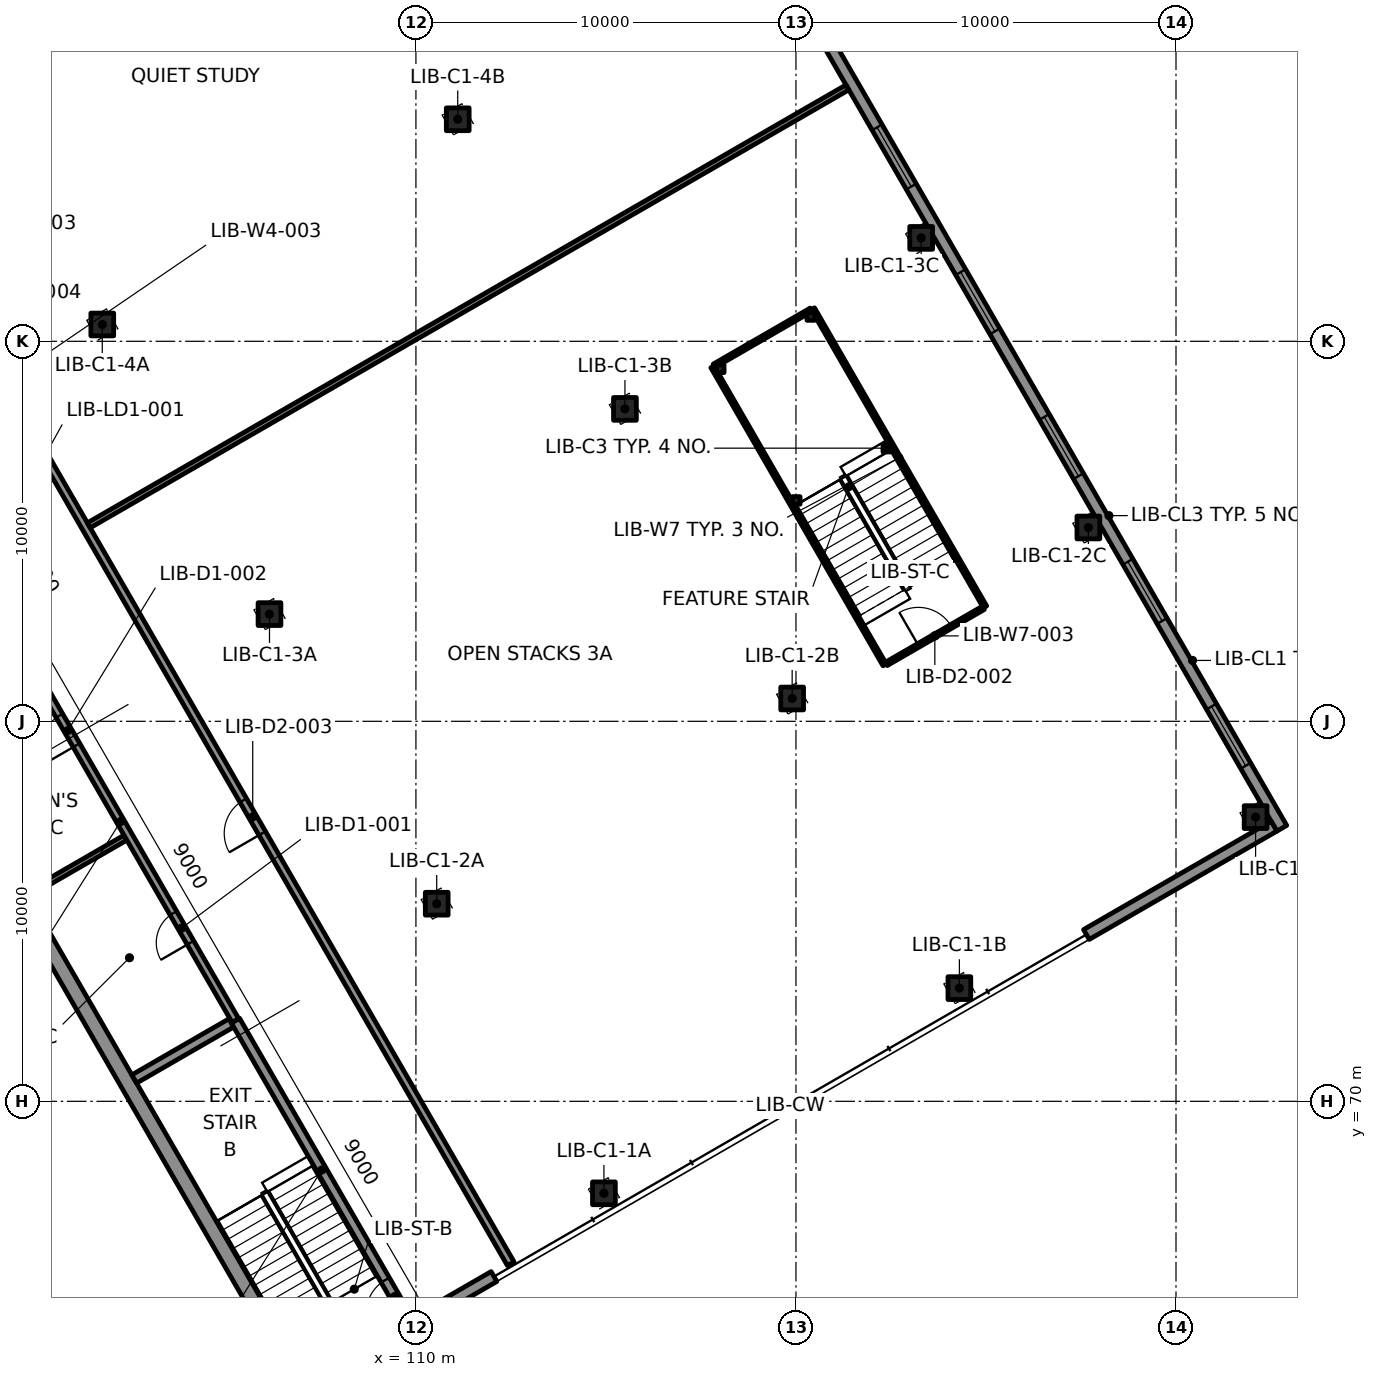
"""IFC4 building model, lengths in metres.
Left out: names, types, materials, properties, quantities, classifications, styles, units other than length and angle.
Written with IfcOpenShell. Run it as: python <this file> out.ifc"""

import sys

from ifc_helpers import new_model, si_unit, direction, frame, frame_2d, origin, origin_2d, place, context, subcontext, project, spatial, rectangle, extrude, element, fill, save


model = new_model("IFC4")
c1 = context("Model", 3, precision=1e-05, world=origin(), true_north=direction((0.0, 1.0)))
c2 = subcontext(c1, "Body", "Model", "MODEL_VIEW")
j1 = project(units=[si_unit("LENGTHUNIT", "METRE"), si_unit("PLANEANGLEUNIT", "RADIAN")], contexts=[c1])
p1 = place(None, origin())
s1 = spatial("IfcSite", under=j1, at=p1, CompositionType="ELEMENT")
p2 = place(p1, origin())
s2 = spatial("IfcBuilding", under=s1, at=p2, CompositionType="ELEMENT")
p3 = place(p2, frame((0.0, 0.0, 17.2)))
s3 = spatial("IfcBuildingStorey", under=s2, at=p3, CompositionType="ELEMENT", Elevation=17.2)
p4 = place(p3, frame((101.821, 68.315, -0.0), z_axis=(0.0, 0.0, 1.0), x_axis=(-0.5, 0.866025403784, 0.0)))
e1 = element("IfcColumn", 1, at=p4, inside=s3, PredefinedType="COLUMN", context=c2, shape_type="SweptSolid", body=[
    extrude(rectangle(XDim=1.2, YDim=1.5, at=origin_2d()), origin(), (0.0, 0.0, 1.0), 4.6),
])
p5 = place(p3, frame((103.019, 59.863, 0.0), z_axis=(0.0, 0.0, 1.0), x_axis=(-0.866027754727, 0.499995928025, 0.0)))
e2 = element("IfcWall", 2, at=p5, inside=s3, PredefinedType="PARTITIONING", context=c2, shape_type="SweptSolid", body=[
    extrude(rectangle(XDim=13.214, YDim=0.15, at=frame_2d((6.607, 0.0))), origin(), (0.0, 0.0, 1.0), 3.7),
])
for number, where, z_axis, x_axis in (
    (3, (114.947, 67.579, -0.36), (0.0, 0.0, 1.0), (1.0, 0.0, 0.0)),
    (4, (124.3, 72.979, -0.36), (0.0, 0.0, 1.0), (1.0, 0.0, 0.0)),
    (5, (132.094, 77.479, -0.36), (0.0, 0.0, 1.0), (1.0, 0.0, 0.0)),
    (6, (110.547, 75.2, -0.36), (0.0, 0.0, 1.0), (1.0, 0.0, 0.0)),
    (7, (119.9, 80.6, -0.36), (0.0, 0.0, 1.0), (1.0, 0.0, 0.0)),
    (8, (127.694, 85.1, -0.36), (0.0, 0.0, 1.0), (1.0, 0.0, 0.0)),
    (9, (106.147, 82.821, -0.36), (0.0, 0.0, 1.0), (1.0, 0.0, 0.0)),
    (10, (115.5, 88.221, -0.36), (0.0, 0.0, 1.0), (1.0, 0.0, 0.0)),
    (11, (123.294, 92.721, -0.36), (0.0, 0.0, 1.0), (1.0, 0.0, 0.0)),
    (12, (101.747, 90.442, -0.36), (0.0, 0.0, 1.0), (1.0, 0.0, 0.0)),
    (13, (111.1, 95.842, -0.36), (0.0, 0.0, 1.0), (1.0, 0.0, 0.0)),
):
    element("IfcColumn", number, at=place(p3, frame(where, z_axis=z_axis, x_axis=x_axis)), inside=s3, PredefinedType="COLUMN", context=c2, shape_type="SweptSolid", body=[
        extrude(rectangle(XDim=0.6, YDim=0.6, at=origin_2d()), origin(), (0.0, 0.0, 1.0), 4.6),
    ])
for number, where, z_axis, x_axis in (
    (14, (122.39, 87.188, -2.3), (0.0, 0.0, 1.0), (1.0, 0.0, 0.0)),
    (15, (120.008, 85.813, -2.3), (0.0, 0.0, 1.0), (1.0, 0.0, 0.0)),
    (16, (120.39, 90.652, -2.3), (0.0, 0.0, 1.0), (1.0, 0.0, 0.0)),
    (17, (118.008, 89.277, -2.3), (0.0, 0.0, 1.0), (1.0, 0.0, 0.0)),
):
    element("IfcColumn", number, at=place(p3, frame(where, z_axis=z_axis, x_axis=x_axis)), inside=s3, PredefinedType="COLUMN", context=c2, shape_type="SweptSolid", body=[
        extrude(rectangle(XDim=0.2, YDim=0.2, at=origin_2d()), origin(), (0.0, 0.0, 1.0), 4.4),
    ])
p6 = place(p3, frame((107.106, 62.36, 0.0), z_axis=(0.0, 0.0, 1.0), x_axis=(-0.49999992739, 0.866025445706, 0.0)))
e18 = element("IfcWall", 18, at=p6, inside=s3, PredefinedType="SOLIDWALL", context=c2, shape_type="SweptSolid", body=[
    extrude(rectangle(XDim=54.0, YDim=0.4, at=frame_2d((27.0, 0.0))), origin(), (0.0, 0.0, 1.0), 4.24),
])
p7 = place(p3, frame((132.784, 77.185, 0.0), z_axis=(0.0, 0.0, 1.0), x_axis=(-0.49999992739, 0.866025445706, 0.0)))
e19 = element("IfcWall", 19, at=p7, inside=s3, PredefinedType="SOLIDWALL", context=c2, shape_type="SweptSolid", body=[
    extrude(rectangle(XDim=54.0, YDim=0.3, at=frame_2d((27.0, 0.0))), origin(), (0.0, 0.0, 1.0), 4.24),
])
p8 = place(p7, frame((1.9, 0.0, 0.9)))
e20 = element("IfcOpeningElement", 20, at=p8, cuts=e19, PredefinedType="OPENING", context=c2, shape_type="SweptSolid", body=[
    extrude(rectangle(XDim=1.8, YDim=2.4, at=frame_2d((0.9, 1.2))), frame((0.0, 0.16, 0.0), z_axis=(0.0, -1.0, 0.0), x_axis=(1.0, 0.0, 0.0)), (0.0, 0.0, 1.0), 0.32),
])
p9 = place(p7, frame((6.3, 0.0, 0.9)))
e21 = element("IfcOpeningElement", 21, at=p9, cuts=e19, PredefinedType="OPENING", context=c2, shape_type="SweptSolid", body=[
    extrude(rectangle(XDim=1.8, YDim=2.4, at=frame_2d((0.9, 1.2))), frame((0.0, 0.16, 0.0), z_axis=(0.0, -1.0, 0.0), x_axis=(1.0, 0.0, 0.0)), (0.0, 0.0, 1.0), 0.32),
])
p10 = place(p7, frame((10.7, 0.0, 0.9)))
e22 = element("IfcOpeningElement", 22, at=p10, cuts=e19, PredefinedType="OPENING", context=c2, shape_type="SweptSolid", body=[
    extrude(rectangle(XDim=1.8, YDim=2.4, at=frame_2d((0.9, 1.2))), frame((0.0, 0.16, 0.0), z_axis=(0.0, -1.0, 0.0), x_axis=(1.0, 0.0, 0.0)), (0.0, 0.0, 1.0), 0.32),
])
p11 = place(p7, frame((15.1, 0.0, 0.9)))
e23 = element("IfcOpeningElement", 23, at=p11, cuts=e19, PredefinedType="OPENING", context=c2, shape_type="SweptSolid", body=[
    extrude(rectangle(XDim=1.8, YDim=2.4, at=frame_2d((0.9, 1.2))), frame((0.0, 0.16, 0.0), z_axis=(0.0, -1.0, 0.0), x_axis=(1.0, 0.0, 0.0)), (0.0, 0.0, 1.0), 0.32),
])
p12 = place(p7, frame((19.5, 0.0, 0.9)))
e24 = element("IfcOpeningElement", 24, at=p12, cuts=e19, PredefinedType="OPENING", context=c2, shape_type="SweptSolid", body=[
    extrude(rectangle(XDim=1.8, YDim=2.4, at=frame_2d((0.9, 1.2))), frame((0.0, 0.16, 0.0), z_axis=(0.0, -1.0, 0.0), x_axis=(1.0, 0.0, 0.0)), (0.0, 0.0, 1.0), 0.32),
])
p13 = place(p7, frame((23.9, 0.0, 0.9)))
e25 = element("IfcOpeningElement", 25, at=p13, cuts=e19, PredefinedType="OPENING", context=c2, shape_type="SweptSolid", body=[
    extrude(rectangle(XDim=1.8, YDim=2.4, at=frame_2d((0.9, 1.2))), frame((0.0, 0.16, 0.0), z_axis=(0.0, -1.0, 0.0), x_axis=(1.0, 0.0, 0.0)), (0.0, 0.0, 1.0), 0.32),
])
p14 = place(p7, frame((28.3, 0.0, 0.9)))
e26 = element("IfcOpeningElement", 26, at=p14, cuts=e19, PredefinedType="OPENING", context=c2, shape_type="SweptSolid", body=[
    extrude(rectangle(XDim=1.8, YDim=2.4, at=frame_2d((0.9, 1.2))), frame((0.0, 0.16, 0.0), z_axis=(0.0, -1.0, 0.0), x_axis=(1.0, 0.0, 0.0)), (0.0, 0.0, 1.0), 0.32),
])
p15 = place(p7, frame((32.7, 0.0, 0.9)))
e27 = element("IfcOpeningElement", 27, at=p15, cuts=e19, PredefinedType="OPENING", context=c2, shape_type="SweptSolid", body=[
    extrude(rectangle(XDim=1.8, YDim=2.4, at=frame_2d((0.9, 1.2))), frame((0.0, 0.16, 0.0), z_axis=(0.0, -1.0, 0.0), x_axis=(1.0, 0.0, 0.0)), (0.0, 0.0, 1.0), 0.32),
])
p16 = place(p7, frame((37.1, 0.0, 0.9)))
e28 = element("IfcOpeningElement", 28, at=p16, cuts=e19, PredefinedType="OPENING", context=c2, shape_type="SweptSolid", body=[
    extrude(rectangle(XDim=1.8, YDim=2.4, at=frame_2d((0.9, 1.2))), frame((0.0, 0.16, 0.0), z_axis=(0.0, -1.0, 0.0), x_axis=(1.0, 0.0, 0.0)), (0.0, 0.0, 1.0), 0.32),
])
p17 = place(p7, frame((50.3, 0.0, 0.9)))
e29 = element("IfcOpeningElement", 29, at=p17, cuts=e19, PredefinedType="OPENING", context=c2, shape_type="SweptSolid", body=[
    extrude(rectangle(XDim=1.8, YDim=2.4, at=frame_2d((0.9, 1.2))), frame((0.0, 0.16, 0.0), z_axis=(0.0, -1.0, 0.0), x_axis=(1.0, 0.0, 0.0)), (0.0, 0.0, 1.0), 0.32),
])
p18 = place(p3, frame((107.204, 62.59, 0.0), z_axis=(0.0, 0.0, 1.0), x_axis=(0.866045472092, 0.499965239061, 0.0)))
e30 = element("IfcWall", 30, at=p18, inside=s3, PredefinedType="SOLIDWALL", context=c2, shape_type="SweptSolid", body=[
    extrude(rectangle(XDim=5.6, YDim=0.3, at=frame_2d((2.8, 0.0))), origin(), (0.0, 0.0, 1.0), 4.24),
])
p19 = place(p3, frame((127.643, 74.389, 0.0), z_axis=(0.0, 0.0, 1.0), x_axis=(0.866025820012, 0.499999279071, 0.0)))
e31 = element("IfcWall", 31, at=p19, inside=s3, PredefinedType="SOLIDWALL", context=c2, shape_type="SweptSolid", body=[
    extrude(rectangle(XDim=5.7, YDim=0.3, at=frame_2d((2.85, 0.0))), origin(), (0.0, 0.0, 1.0), 4.24),
])
p20 = place(p3, frame((102.587, 70.587, 0.0), z_axis=(0.0, 0.0, 1.0), x_axis=(0.866039495442, 0.49997559174, 0.0)))
e32 = element("IfcWall", 32, at=p20, inside=s3, PredefinedType="SOLIDWALL", context=c2, shape_type="SweptSolid", body=[
    extrude(rectangle(XDim=2.95, YDim=0.25, at=frame_2d((1.475, 0.0))), origin(), (0.0, 0.0, 1.0), 4.24),
])
p21 = place(p3, frame((109.792, 64.257, 0.0), z_axis=(0.0, 0.0, 1.0), x_axis=(-0.499994616197, 0.866028512102, 0.0)))
e33 = element("IfcWall", 33, at=p21, inside=s3, PredefinedType="SOLIDWALL", context=c2, shape_type="SweptSolid", body=[
    extrude(rectangle(XDim=9.085, YDim=0.25, at=frame_2d((4.542, 0.0))), origin(), (0.0, 0.0, 1.0), 4.24),
])
p22 = place(p21, frame((0.2, 0.0, 0.0)))
e34 = element("IfcOpeningElement", 34, at=p22, cuts=e33, PredefinedType="OPENING", context=c2, shape_type="SweptSolid", body=[
    extrude(rectangle(XDim=1.0, YDim=2.1, at=frame_2d((0.5, 1.05))), frame((0.0, 0.135, 0.0), z_axis=(0.0, -1.0, 0.0), x_axis=(1.0, 0.0, 0.0)), (0.0, 0.0, 1.0), 0.27),
])
p23 = place(p3, frame((99.779, 75.45, 0.0), z_axis=(0.0, 0.0, 1.0), x_axis=(0.866017493347, 0.500013701029, 0.0)))
e35 = element("IfcWall", 35, at=p23, inside=s3, PredefinedType="PARTITIONING", context=c2, shape_type="SweptSolid", body=[
    extrude(rectangle(XDim=2.975, YDim=0.15, at=frame_2d((1.488, 0.0))), origin(), (0.0, 0.0, 1.0), 4.24),
])
p24 = place(p3, frame((105.25, 72.125, 0.0), z_axis=(0.0, 0.0, 1.0), x_axis=(-0.499996309931, 0.866027534236, 0.0)))
e36 = element("IfcWall", 36, at=p24, inside=s3, PredefinedType="PARTITIONING", context=c2, shape_type="SweptSolid", body=[
    extrude(rectangle(XDim=12.09, YDim=0.2, at=frame_2d((6.045, 0.0))), origin(), (0.0, 0.0, 1.0), 4.24),
])
p25 = place(p24, frame((2.365, 0.0, 0.0)))
e37 = element("IfcOpeningElement", 37, at=p25, cuts=e36, PredefinedType="OPENING", context=c2, shape_type="SweptSolid", body=[
    extrude(rectangle(XDim=0.9, YDim=2.1, at=frame_2d((0.45, 1.05))), frame((0.0, 0.11, 0.0), z_axis=(0.0, -1.0, 0.0), x_axis=(1.0, 0.0, 0.0)), (0.0, 0.0, 1.0), 0.22),
])
p26 = place(p24, frame((8.365, 0.0, 0.0)))
e38 = element("IfcOpeningElement", 38, at=p26, cuts=e36, PredefinedType="OPENING", context=c2, shape_type="SweptSolid", body=[
    extrude(rectangle(XDim=0.9, YDim=2.1, at=frame_2d((0.45, 1.05))), frame((0.0, 0.11, 0.0), z_axis=(0.0, -1.0, 0.0), x_axis=(1.0, 0.0, 0.0)), (0.0, 0.0, 1.0), 0.22),
])
p27 = place(p3, frame((112.496, 65.725, 0.0), z_axis=(0.0, 0.0, 1.0), x_axis=(-0.499998673217, 0.866026169802, 0.0)))
e39 = element("IfcWall", 39, at=p27, inside=s3, PredefinedType="PARTITIONING", context=c2, shape_type="SweptSolid", body=[
    extrude(rectangle(XDim=53.48, YDim=0.2, at=frame_2d((26.74, 0.0))), origin(), (0.0, 0.0, 1.0), 4.24),
])
p28 = place(p27, frame((13.08, 0.0, 0.0)))
e40 = element("IfcOpeningElement", 40, at=p28, cuts=e39, PredefinedType="OPENING", context=c2, shape_type="SweptSolid", body=[
    extrude(rectangle(XDim=1.0, YDim=2.1, at=frame_2d((0.5, 1.05))), frame((0.0, 0.11, 0.0), z_axis=(0.0, -1.0, 0.0), x_axis=(1.0, 0.0, 0.0)), (0.0, 0.0, 1.0), 0.22),
])
p29 = place(p27, frame((26.28, 0.0, 0.0)))
e41 = element("IfcOpeningElement", 41, at=p29, cuts=e39, PredefinedType="OPENING", context=c2, shape_type="SweptSolid", body=[
    extrude(rectangle(XDim=1.0, YDim=2.1, at=frame_2d((0.5, 1.05))), frame((0.0, 0.11, 0.0), z_axis=(0.0, -1.0, 0.0), x_axis=(1.0, 0.0, 0.0)), (0.0, 0.0, 1.0), 0.22),
])
p30 = place(p27, frame((43.88, 0.0, 0.0)))
e42 = element("IfcOpeningElement", 42, at=p30, cuts=e39, PredefinedType="OPENING", context=c2, shape_type="SweptSolid", body=[
    extrude(rectangle(XDim=1.0, YDim=2.1, at=frame_2d((0.5, 1.05))), frame((0.0, 0.11, 0.0), z_axis=(0.0, -1.0, 0.0), x_axis=(1.0, 0.0, 0.0)), (0.0, 0.0, 1.0), 0.22),
])
p31 = place(p27, frame((50.58, 0.0, 0.0)))
e43 = element("IfcOpeningElement", 43, at=p31, cuts=e39, PredefinedType="OPENING", context=c2, shape_type="SweptSolid", body=[
    extrude(rectangle(XDim=1.0, YDim=2.1, at=frame_2d((0.5, 1.05))), frame((0.0, 0.11, 0.0), z_axis=(0.0, -1.0, 0.0), x_axis=(1.0, 0.0, 0.0)), (0.0, 0.0, 1.0), 0.22),
])
p32 = place(p3, frame((101.392, 85.157, 0.0), z_axis=(0.0, 0.0, 1.0), x_axis=(0.866022961126, 0.500004230785, 0.0)))
e44 = element("IfcWall", 44, at=p32, inside=s3, PredefinedType="PARTITIONING", context=c2, shape_type="SweptSolid", body=[
    extrude(rectangle(XDim=23.05, YDim=0.15, at=frame_2d((11.525, 0.0))), origin(), (0.0, 0.0, 1.0), 4.24),
])
for number, where, z_axis, x_axis in (
    (45, (122.333, 81.486, 0.0), (0.0, 0.0, 1.0), (-0.5, 0.866, 0.0)),
    (46, (124.975, 83.01, 0.0), (0.0, 0.0, 1.0), (-0.5, 0.866, 0.0)),
):
    element("IfcWall", number, at=place(p3, frame(where, z_axis=z_axis, x_axis=x_axis)), inside=s3, PredefinedType="PARTITIONING", context=c2, shape_type="SweptSolid", body=[
        extrude(rectangle(XDim=9.06, YDim=0.1, at=frame_2d((4.53, 0.0))), origin(), (0.0, 0.0, 1.0), 4.24),
    ])
p33 = place(p3, frame((122.377, 81.51, 0.0), z_axis=(0.0, 0.0, 1.0), x_axis=(0.866003658127, 0.500037662692, 0.0)))
e47 = element("IfcWall", 47, at=p33, inside=s3, PredefinedType="PARTITIONING", context=c2, shape_type="SweptSolid", body=[
    extrude(rectangle(XDim=2.95, YDim=0.1, at=frame_2d((1.475, 0.0))), origin(), (0.0, 0.0, 1.0), 4.24),
])
p34 = place(p33, frame((0.975, 0.0, 0.0)))
e48 = element("IfcOpeningElement", 48, at=p34, cuts=e47, PredefinedType="OPENING", context=c2, shape_type="SweptSolid", body=[
    extrude(rectangle(XDim=1.0, YDim=2.1, at=frame_2d((0.5, 1.05))), frame((0.0, 0.06, 0.0), z_axis=(0.0, -1.0, 0.0), x_axis=(1.0, 0.0, 0.0)), (0.0, 0.0, 1.0), 0.12),
])
p35 = place(p3, frame((117.847, 89.357, 0.0), z_axis=(0.0, 0.0, 1.0), x_axis=(0.866003658127, 0.500037662692, 0.0)))
e49 = element("IfcWall", 49, at=p35, inside=s3, PredefinedType="PARTITIONING", context=c2, shape_type="SweptSolid", body=[
    extrude(rectangle(XDim=2.95, YDim=0.1, at=frame_2d((1.475, 0.0))), origin(), (0.0, 0.0, 1.0), 4.24),
])
p36 = place(p8, origin())
e50 = element("IfcWindow", 50, at=p36, inside=s3, PartitioningType="SINGLE_PANEL", PredefinedType="WINDOW", context=c2, shape_type="SweptSolid", body=[
    extrude(rectangle(XDim=1.8, YDim=2.4, at=frame_2d((0.9, 1.2))), frame((0.0, 0.03, 0.0), z_axis=(0.0, -1.0, 0.0), x_axis=(1.0, 0.0, 0.0)), (0.0, 0.0, 1.0), 0.06),
])
fill(e20, e50)
p37 = place(p9, origin())
e51 = element("IfcWindow", 51, at=p37, inside=s3, PartitioningType="SINGLE_PANEL", PredefinedType="WINDOW", context=c2, shape_type="SweptSolid", body=[
    extrude(rectangle(XDim=1.8, YDim=2.4, at=frame_2d((0.9, 1.2))), frame((0.0, 0.03, 0.0), z_axis=(0.0, -1.0, 0.0), x_axis=(1.0, 0.0, 0.0)), (0.0, 0.0, 1.0), 0.06),
])
fill(e21, e51)
p38 = place(p10, origin())
e52 = element("IfcWindow", 52, at=p38, inside=s3, PartitioningType="SINGLE_PANEL", PredefinedType="WINDOW", context=c2, shape_type="SweptSolid", body=[
    extrude(rectangle(XDim=1.8, YDim=2.4, at=frame_2d((0.9, 1.2))), frame((0.0, 0.03, 0.0), z_axis=(0.0, -1.0, 0.0), x_axis=(1.0, 0.0, 0.0)), (0.0, 0.0, 1.0), 0.06),
])
fill(e22, e52)
p39 = place(p11, origin())
e53 = element("IfcWindow", 53, at=p39, inside=s3, PartitioningType="SINGLE_PANEL", PredefinedType="WINDOW", context=c2, shape_type="SweptSolid", body=[
    extrude(rectangle(XDim=1.8, YDim=2.4, at=frame_2d((0.9, 1.2))), frame((0.0, 0.03, 0.0), z_axis=(0.0, -1.0, 0.0), x_axis=(1.0, 0.0, 0.0)), (0.0, 0.0, 1.0), 0.06),
])
fill(e23, e53)
p40 = place(p12, origin())
e54 = element("IfcWindow", 54, at=p40, inside=s3, PartitioningType="SINGLE_PANEL", PredefinedType="WINDOW", context=c2, shape_type="SweptSolid", body=[
    extrude(rectangle(XDim=1.8, YDim=2.4, at=frame_2d((0.9, 1.2))), frame((0.0, 0.03, 0.0), z_axis=(0.0, -1.0, 0.0), x_axis=(1.0, 0.0, 0.0)), (0.0, 0.0, 1.0), 0.06),
])
fill(e24, e54)
p41 = place(p22, origin())
e55 = element("IfcDoor", 55, at=p41, inside=s3, OperationType="SINGLE_SWING_LEFT", PredefinedType="DOOR", context=c2, shape_type="SweptSolid", body=[
    extrude(rectangle(XDim=1.0, YDim=2.1, at=frame_2d((0.5, 1.05))), frame((0.0, 0.025, 0.0), z_axis=(0.0, -1.0, 0.0), x_axis=(1.0, 0.0, 0.0)), (0.0, 0.0, 1.0), 0.05),
])
fill(e34, e55)
p42 = place(p25, origin())
e56 = element("IfcDoor", 56, at=p42, inside=s3, OperationType="SINGLE_SWING_LEFT", PredefinedType="DOOR", context=c2, shape_type="SweptSolid", body=[
    extrude(rectangle(XDim=0.9, YDim=2.1, at=frame_2d((0.45, 1.05))), frame((0.0, 0.025, 0.0), z_axis=(0.0, -1.0, 0.0), x_axis=(1.0, 0.0, 0.0)), (0.0, 0.0, 1.0), 0.05),
])
fill(e37, e56)
p43 = place(p26, origin())
e57 = element("IfcDoor", 57, at=p43, inside=s3, OperationType="SINGLE_SWING_RIGHT", PredefinedType="DOOR", context=c2, shape_type="SweptSolid", body=[
    extrude(rectangle(XDim=0.9, YDim=2.1, at=frame_2d((0.45, 1.05))), frame((0.0, 0.025, 0.0), z_axis=(0.0, -1.0, 0.0), x_axis=(1.0, 0.0, 0.0)), (0.0, 0.0, 1.0), 0.05),
])
fill(e38, e57)
p44 = place(p34, origin())
e58 = element("IfcDoor", 58, at=p44, inside=s3, OperationType="SINGLE_SWING_RIGHT", PredefinedType="DOOR", context=c2, shape_type="SweptSolid", body=[
    extrude(rectangle(XDim=1.0, YDim=2.1, at=frame_2d((0.5, 1.05))), frame((0.0, 0.025, 0.0), z_axis=(0.0, -1.0, 0.0), x_axis=(1.0, 0.0, 0.0)), (0.0, 0.0, 1.0), 0.05),
])
fill(e48, e58)
p45 = place(p28, origin())
e59 = element("IfcDoor", 59, at=p45, inside=s3, OperationType="SINGLE_SWING_LEFT", PredefinedType="DOOR", context=c2, shape_type="SweptSolid", body=[
    extrude(rectangle(XDim=1.0, YDim=2.1, at=frame_2d((0.5, 1.05))), frame((0.0, 0.025, 0.0), z_axis=(0.0, -1.0, 0.0), x_axis=(1.0, 0.0, 0.0)), (0.0, 0.0, 1.0), 0.05),
])
fill(e40, e59)
save(model, sys.argv[1])
